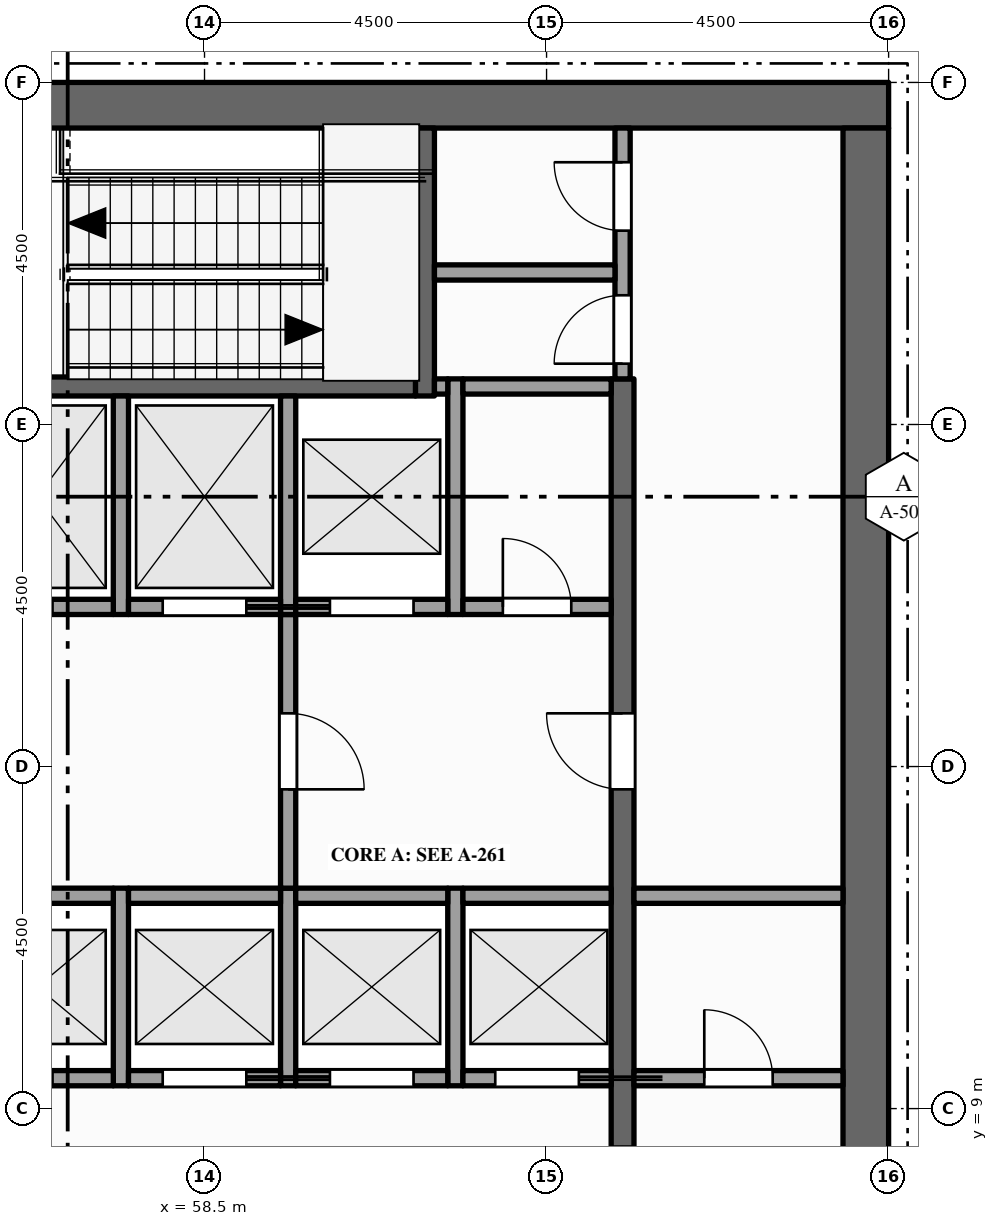
"""IFC4 building model, lengths in metres.
Left out: names, types, materials, properties, quantities, classifications, styles, units other than length and angle.
Written with IfcOpenShell. Run it as: python <this file> out.ifc"""

import sys

from ifc_helpers import new_model, si_unit, direction, frame, frame_2d, origin, place, context, subcontext, project, spatial, rectangle, extrude, element, fill, save


model = new_model("IFC4")
c1 = context("Model", 3, precision=1e-05, world=origin(), true_north=direction((0.0, 1.0)))
c2 = subcontext(c1, "Body", "Model", "MODEL_VIEW")
j1 = project(units=[si_unit("LENGTHUNIT", "METRE"), si_unit("PLANEANGLEUNIT", "RADIAN")], contexts=[c1])
p1 = place(None, origin())
s1 = spatial("IfcSite", under=j1, at=p1, CompositionType="ELEMENT")
p2 = place(p1, origin())
s2 = spatial("IfcBuilding", under=s1, at=p2, CompositionType="ELEMENT")
p3 = place(p2, frame((0.0, 0.0, 336.5)))
s3 = spatial("IfcBuildingStorey", under=s2, at=p3, CompositionType="ELEMENT", Elevation=336.5)
p4 = place(p3, frame((54.0, 22.2, -0.15), z_axis=(0.0, 0.0, 1.0), x_axis=(1.0, 0.0, 0.0)))
e1 = element("IfcWall", 1, at=p4, inside=s3, PredefinedType="SHEAR", context=c2, shape_type="SweptSolid", body=[
    extrude(rectangle(XDim=13.5, YDim=0.6, at=frame_2d((6.75, 0.0))), origin(), (0.0, 0.0, 1.0), 4.5),
])
p5 = place(p3, frame((67.2, 0.6, -0.15), z_axis=(0.0, 0.0, 1.0), x_axis=(0.0, 1.0, 0.0)))
e2 = element("IfcWall", 2, at=p5, inside=s3, PredefinedType="SHEAR", context=c2, shape_type="SweptSolid", body=[
    extrude(rectangle(XDim=21.3, YDim=0.6, at=frame_2d((10.65, 0.0))), origin(), (0.0, 0.0, 1.0), 4.5),
])
p6 = place(p3, frame((57.4, 9.3, 0.0), z_axis=(0.0, 0.0, 1.0), x_axis=(0.0, 1.0, 0.0)))
e3 = element("IfcWall", 3, at=p6, inside=s3, PredefinedType="SOLIDWALL", context=c2, shape_type="SweptSolid", body=[
    extrude(rectangle(XDim=2.6, YDim=0.2, at=frame_2d((1.3, 0.0))), origin(), (0.0, 0.0, 1.0), 4.35),
])
p7 = place(p3, frame((57.4, 15.5, 0.0), z_axis=(0.0, 0.0, 1.0), x_axis=(0.0, 1.0, 0.0)))
e4 = element("IfcWall", 4, at=p7, inside=s3, PredefinedType="SOLIDWALL", context=c2, shape_type="SweptSolid", body=[
    extrude(rectangle(XDim=2.875, YDim=0.2, at=frame_2d((1.438, 0.0))), origin(), (0.0, 0.0, 1.0), 4.35),
])
p8 = place(p3, frame((59.6, 9.3, 0.0), z_axis=(0.0, 0.0, 1.0), x_axis=(0.0, 1.0, 0.0)))
e5 = element("IfcWall", 5, at=p8, inside=s3, PredefinedType="SOLIDWALL", context=c2, shape_type="SweptSolid", body=[
    extrude(rectangle(XDim=2.6, YDim=0.2, at=frame_2d((1.3, 0.0))), origin(), (0.0, 0.0, 1.0), 4.35),
])
p9 = place(p3, frame((59.6, 11.9, 0.0), z_axis=(0.0, 0.0, 1.0), x_axis=(0.0, 1.0, 0.0)))
e6 = element("IfcWall", 6, at=p9, inside=s3, PredefinedType="PARTITIONING", context=c2, shape_type="SweptSolid", body=[
    extrude(rectangle(XDim=3.6, YDim=0.2, at=frame_2d((1.8, 0.0))), origin(), (0.0, 0.0, 1.0), 4.35),
])
p10 = place(p9, frame((1.3, 0.0, 0.0)))
e7 = element("IfcOpeningElement", 7, at=p10, cuts=e6, PredefinedType="OPENING", context=c2, shape_type="SweptSolid", body=[
    extrude(rectangle(XDim=1.0, YDim=2.1, at=frame_2d((0.5, 1.05))), frame((0.0, 0.11, 0.0), z_axis=(0.0, -1.0, 0.0), x_axis=(1.0, 0.0, 0.0)), (0.0, 0.0, 1.0), 0.22),
])
p11 = place(p3, frame((59.6, 15.5, 0.0), z_axis=(0.0, 0.0, 1.0), x_axis=(0.0, 1.0, 0.0)))
e8 = element("IfcWall", 8, at=p11, inside=s3, PredefinedType="SOLIDWALL", context=c2, shape_type="SweptSolid", body=[
    extrude(rectangle(XDim=2.875, YDim=0.2, at=frame_2d((1.438, 0.0))), origin(), (0.0, 0.0, 1.0), 4.35),
])
p12 = place(p3, frame((61.4, 18.375, 0.0), z_axis=(0.0, 0.0, 1.0), x_axis=(0.0, 1.0, 0.0)))
e9 = element("IfcWall", 9, at=p12, inside=s3, PredefinedType="SHEAR", context=c2, shape_type="SweptSolid", body=[
    extrude(rectangle(XDim=3.525, YDim=0.25, at=frame_2d((1.762, 0.0))), origin(), (0.0, 0.0, 1.0), 4.35),
])
p13 = place(p3, frame((61.8, 9.3, 0.0), z_axis=(0.0, 0.0, 1.0), x_axis=(0.0, 1.0, 0.0)))
e10 = element("IfcWall", 10, at=p13, inside=s3, PredefinedType="SOLIDWALL", context=c2, shape_type="SweptSolid", body=[
    extrude(rectangle(XDim=2.6, YDim=0.2, at=frame_2d((1.3, 0.0))), origin(), (0.0, 0.0, 1.0), 4.35),
])
p14 = place(p3, frame((61.8, 15.5, 0.0), z_axis=(0.0, 0.0, 1.0), x_axis=(0.0, 1.0, 0.0)))
e11 = element("IfcWall", 11, at=p14, inside=s3, PredefinedType="SOLIDWALL", context=c2, shape_type="SweptSolid", body=[
    extrude(rectangle(XDim=3.1, YDim=0.2, at=frame_2d((1.55, 0.0))), origin(), (0.0, 0.0, 1.0), 4.35),
])
p15 = place(p3, frame((64.0, 4.1, 0.0), z_axis=(0.0, 0.0, 1.0), x_axis=(0.0, 1.0, 0.0)))
e12 = element("IfcWall", 12, at=p15, inside=s3, PredefinedType="SHEAR", context=c2, shape_type="SweptSolid", body=[
    extrude(rectangle(XDim=14.5, YDim=0.3, at=frame_2d((7.25, 0.0))), origin(), (0.0, 0.0, 1.0), 4.35),
])
p16 = place(p15, frame((3.4, 0.0, 0.0)))
e13 = element("IfcOpeningElement", 13, at=p16, cuts=e12, PredefinedType="OPENING", context=c2, shape_type="SweptSolid", body=[
    extrude(rectangle(XDim=1.0, YDim=2.1, at=frame_2d((0.5, 1.05))), frame((0.0, 0.16, 0.0), z_axis=(0.0, -1.0, 0.0), x_axis=(1.0, 0.0, 0.0)), (0.0, 0.0, 1.0), 0.32),
])
p17 = place(p15, frame((9.1, 0.0, 0.0)))
e14 = element("IfcOpeningElement", 14, at=p17, cuts=e12, PredefinedType="OPENING", context=c2, shape_type="SweptSolid", body=[
    extrude(rectangle(XDim=1.0, YDim=2.1, at=frame_2d((0.5, 1.05))), frame((0.0, 0.16, 0.0), z_axis=(0.0, -1.0, 0.0), x_axis=(1.0, 0.0, 0.0)), (0.0, 0.0, 1.0), 0.32),
])
p18 = place(p3, frame((64.0, 18.6, 0.0), z_axis=(0.0, 0.0, 1.0), x_axis=(0.0, 1.0, 0.0)))
e15 = element("IfcWall", 15, at=p18, inside=s3, PredefinedType="PARTITIONING", context=c2, shape_type="SweptSolid", body=[
    extrude(rectangle(XDim=3.3, YDim=0.2, at=frame_2d((1.65, 0.0))), origin(), (0.0, 0.0, 1.0), 4.35),
])
p19 = place(p18, frame((0.2, 0.0, 0.0)))
e16 = element("IfcOpeningElement", 16, at=p19, cuts=e15, PredefinedType="OPENING", context=c2, shape_type="SweptSolid", body=[
    extrude(rectangle(XDim=0.9, YDim=2.1, at=frame_2d((0.45, 1.05))), frame((0.0, 0.11, 0.0), z_axis=(0.0, -1.0, 0.0), x_axis=(1.0, 0.0, 0.0)), (0.0, 0.0, 1.0), 0.22),
])
p20 = place(p18, frame((1.95, 0.0, 0.0)))
e17 = element("IfcOpeningElement", 17, at=p20, cuts=e15, PredefinedType="OPENING", context=c2, shape_type="SweptSolid", body=[
    extrude(rectangle(XDim=0.9, YDim=2.1, at=frame_2d((0.45, 1.05))), frame((0.0, 0.11, 0.0), z_axis=(0.0, -1.0, 0.0), x_axis=(1.0, 0.0, 0.0)), (0.0, 0.0, 1.0), 0.22),
])
p21 = place(p3, frame((54.6, 9.4, 0.0), z_axis=(0.0, 0.0, 1.0), x_axis=(1.0, 0.0, 0.0)))
e18 = element("IfcWall", 18, at=p21, inside=s3, PredefinedType="SOLIDWALL", context=c2, shape_type="SweptSolid", body=[
    extrude(rectangle(XDim=2.7, YDim=0.2, at=frame_2d((1.35, 0.0))), origin(), (0.0, 0.0, 1.0), 4.35),
])
p22 = place(p21, frame((0.8, 0.0, 0.012)))
e19 = element("IfcOpeningElement", 19, at=p22, cuts=e18, PredefinedType="OPENING", context=c2, shape_type="SweptSolid", body=[
    extrude(rectangle(XDim=1.1, YDim=2.1, at=frame_2d((0.55, 1.05))), frame((0.0, 0.11, 0.0), z_axis=(0.0, -1.0, 0.0), x_axis=(1.0, 0.0, 0.0)), (0.0, 0.0, 1.0), 0.22),
])
p23 = place(p3, frame((57.5, 9.4, 0.0), z_axis=(0.0, 0.0, 1.0), x_axis=(1.0, 0.0, 0.0)))
e20 = element("IfcWall", 20, at=p23, inside=s3, PredefinedType="SOLIDWALL", context=c2, shape_type="SweptSolid", body=[
    extrude(rectangle(XDim=2.0, YDim=0.2, at=frame_2d((1.0, 0.0))), origin(), (0.0, 0.0, 1.0), 4.35),
])
p24 = place(p23, frame((0.45, 0.0, 0.012)))
e21 = element("IfcOpeningElement", 21, at=p24, cuts=e20, PredefinedType="OPENING", context=c2, shape_type="SweptSolid", body=[
    extrude(rectangle(XDim=1.1, YDim=2.1, at=frame_2d((0.55, 1.05))), frame((0.0, 0.11, 0.0), z_axis=(0.0, -1.0, 0.0), x_axis=(1.0, 0.0, 0.0)), (0.0, 0.0, 1.0), 0.22),
])
p25 = place(p3, frame((59.7, 9.4, 0.0), z_axis=(0.0, 0.0, 1.0), x_axis=(1.0, 0.0, 0.0)))
e22 = element("IfcWall", 22, at=p25, inside=s3, PredefinedType="SOLIDWALL", context=c2, shape_type="SweptSolid", body=[
    extrude(rectangle(XDim=2.0, YDim=0.2, at=frame_2d((1.0, 0.0))), origin(), (0.0, 0.0, 1.0), 4.35),
])
p26 = place(p25, frame((0.45, 0.0, 0.012)))
e23 = element("IfcOpeningElement", 23, at=p26, cuts=e22, PredefinedType="OPENING", context=c2, shape_type="SweptSolid", body=[
    extrude(rectangle(XDim=1.1, YDim=2.1, at=frame_2d((0.55, 1.05))), frame((0.0, 0.11, 0.0), z_axis=(0.0, -1.0, 0.0), x_axis=(1.0, 0.0, 0.0)), (0.0, 0.0, 1.0), 0.22),
])
p27 = place(p3, frame((61.9, 9.4, 0.0), z_axis=(0.0, 0.0, 1.0), x_axis=(1.0, 0.0, 0.0)))
e24 = element("IfcWall", 24, at=p27, inside=s3, PredefinedType="SOLIDWALL", context=c2, shape_type="SweptSolid", body=[
    extrude(rectangle(XDim=1.95, YDim=0.2, at=frame_2d((0.975, 0.0))), origin(), (0.0, 0.0, 1.0), 4.35),
])
p28 = place(p27, frame((0.425, 0.0, 0.012)))
e25 = element("IfcOpeningElement", 25, at=p28, cuts=e24, PredefinedType="OPENING", context=c2, shape_type="SweptSolid", body=[
    extrude(rectangle(XDim=1.1, YDim=2.1, at=frame_2d((0.55, 1.05))), frame((0.0, 0.11, 0.0), z_axis=(0.0, -1.0, 0.0), x_axis=(1.0, 0.0, 0.0)), (0.0, 0.0, 1.0), 0.22),
])
p29 = place(p3, frame((64.15, 9.4, 0.0), z_axis=(0.0, 0.0, 1.0), x_axis=(1.0, 0.0, 0.0)))
e26 = element("IfcWall", 26, at=p29, inside=s3, PredefinedType="PARTITIONING", context=c2, shape_type="SweptSolid", body=[
    extrude(rectangle(XDim=2.75, YDim=0.2, at=frame_2d((1.375, 0.0))), origin(), (0.0, 0.0, 1.0), 4.35),
])
p30 = place(p29, frame((0.925, 0.0, 0.0)))
e27 = element("IfcOpeningElement", 27, at=p30, cuts=e26, PredefinedType="OPENING", context=c2, shape_type="SweptSolid", body=[
    extrude(rectangle(XDim=0.9, YDim=2.1, at=frame_2d((0.45, 1.05))), frame((0.0, 0.11, 0.0), z_axis=(0.0, -1.0, 0.0), x_axis=(1.0, 0.0, 0.0)), (0.0, 0.0, 1.0), 0.22),
])
p31 = place(p3, frame((54.6, 11.8, 0.0), z_axis=(0.0, 0.0, 1.0), x_axis=(1.0, 0.0, 0.0)))
e28 = element("IfcWall", 28, at=p31, inside=s3, PredefinedType="SOLIDWALL", context=c2, shape_type="SweptSolid", body=[
    extrude(rectangle(XDim=2.7, YDim=0.2, at=frame_2d((1.35, 0.0))), origin(), (0.0, 0.0, 1.0), 4.35),
])
for number, where, z_axis, x_axis in (
    (29, (57.5, 11.8, 0.0), (0.0, 0.0, 1.0), (1.0, 0.0, 0.0)),
    (30, (59.7, 11.8, 0.0), (0.0, 0.0, 1.0), (1.0, 0.0, 0.0)),
):
    element("IfcWall", number, at=place(p3, frame(where, z_axis=z_axis, x_axis=x_axis)), inside=s3, PredefinedType="SOLIDWALL", context=c2, shape_type="SweptSolid", body=[
        extrude(rectangle(XDim=2.0, YDim=0.2, at=frame_2d((1.0, 0.0))), origin(), (0.0, 0.0, 1.0), 4.35),
    ])
p32 = place(p3, frame((61.9, 11.8, 0.0), z_axis=(0.0, 0.0, 1.0), x_axis=(1.0, 0.0, 0.0)))
e31 = element("IfcWall", 31, at=p32, inside=s3, PredefinedType="SOLIDWALL", context=c2, shape_type="SweptSolid", body=[
    extrude(rectangle(XDim=1.95, YDim=0.2, at=frame_2d((0.975, 0.0))), origin(), (0.0, 0.0, 1.0), 4.35),
])
p33 = place(p3, frame((64.15, 11.8, 0.0), z_axis=(0.0, 0.0, 1.0), x_axis=(1.0, 0.0, 0.0)))
e32 = element("IfcWall", 32, at=p33, inside=s3, PredefinedType="PARTITIONING", context=c2, shape_type="SweptSolid", body=[
    extrude(rectangle(XDim=2.75, YDim=0.2, at=frame_2d((1.375, 0.0))), origin(), (0.0, 0.0, 1.0), 4.35),
])
p34 = place(p3, frame((54.6, 15.6, 0.0), z_axis=(0.0, 0.0, 1.0), x_axis=(1.0, 0.0, 0.0)))
e33 = element("IfcWall", 33, at=p34, inside=s3, PredefinedType="SOLIDWALL", context=c2, shape_type="SweptSolid", body=[
    extrude(rectangle(XDim=2.7, YDim=0.2, at=frame_2d((1.35, 0.0))), origin(), (0.0, 0.0, 1.0), 4.35),
])
p35 = place(p34, frame((0.8, 0.0, 0.012)))
e34 = element("IfcOpeningElement", 34, at=p35, cuts=e33, PredefinedType="OPENING", context=c2, shape_type="SweptSolid", body=[
    extrude(rectangle(XDim=1.1, YDim=2.1, at=frame_2d((0.55, 1.05))), frame((0.0, 0.11, 0.0), z_axis=(0.0, -1.0, 0.0), x_axis=(1.0, 0.0, 0.0)), (0.0, 0.0, 1.0), 0.22),
])
p36 = place(p3, frame((57.5, 15.6, 0.0), z_axis=(0.0, 0.0, 1.0), x_axis=(1.0, 0.0, 0.0)))
e35 = element("IfcWall", 35, at=p36, inside=s3, PredefinedType="SOLIDWALL", context=c2, shape_type="SweptSolid", body=[
    extrude(rectangle(XDim=2.0, YDim=0.2, at=frame_2d((1.0, 0.0))), origin(), (0.0, 0.0, 1.0), 4.35),
])
p37 = place(p36, frame((0.45, 0.0, 0.012)))
e36 = element("IfcOpeningElement", 36, at=p37, cuts=e35, PredefinedType="OPENING", context=c2, shape_type="SweptSolid", body=[
    extrude(rectangle(XDim=1.1, YDim=2.1, at=frame_2d((0.55, 1.05))), frame((0.0, 0.11, 0.0), z_axis=(0.0, -1.0, 0.0), x_axis=(1.0, 0.0, 0.0)), (0.0, 0.0, 1.0), 0.22),
])
p38 = place(p3, frame((59.7, 15.6, 0.0), z_axis=(0.0, 0.0, 1.0), x_axis=(1.0, 0.0, 0.0)))
e37 = element("IfcWall", 37, at=p38, inside=s3, PredefinedType="SOLIDWALL", context=c2, shape_type="SweptSolid", body=[
    extrude(rectangle(XDim=2.0, YDim=0.2, at=frame_2d((1.0, 0.0))), origin(), (0.0, 0.0, 1.0), 4.35),
])
p39 = place(p38, frame((0.45, 0.0, 0.012)))
e38 = element("IfcOpeningElement", 38, at=p39, cuts=e37, PredefinedType="OPENING", context=c2, shape_type="SweptSolid", body=[
    extrude(rectangle(XDim=1.1, YDim=2.1, at=frame_2d((0.55, 1.05))), frame((0.0, 0.11, 0.0), z_axis=(0.0, -1.0, 0.0), x_axis=(1.0, 0.0, 0.0)), (0.0, 0.0, 1.0), 0.22),
])
p40 = place(p3, frame((61.9, 15.6, 0.0), z_axis=(0.0, 0.0, 1.0), x_axis=(1.0, 0.0, 0.0)))
e39 = element("IfcWall", 39, at=p40, inside=s3, PredefinedType="PARTITIONING", context=c2, shape_type="SweptSolid", body=[
    extrude(rectangle(XDim=1.95, YDim=0.2, at=frame_2d((0.975, 0.0))), origin(), (0.0, 0.0, 1.0), 4.35),
])
p41 = place(p40, frame((0.525, 0.0, 0.0)))
e40 = element("IfcOpeningElement", 40, at=p41, cuts=e39, PredefinedType="OPENING", context=c2, shape_type="SweptSolid", body=[
    extrude(rectangle(XDim=0.9, YDim=2.1, at=frame_2d((0.45, 1.05))), frame((0.0, 0.11, 0.0), z_axis=(0.0, -1.0, 0.0), x_axis=(1.0, 0.0, 0.0)), (0.0, 0.0, 1.0), 0.22),
])
p42 = place(p3, frame((54.6, 18.5, 0.0), z_axis=(0.0, 0.0, 1.0), x_axis=(1.0, 0.0, 0.0)))
e41 = element("IfcWall", 41, at=p42, inside=s3, PredefinedType="SHEAR", context=c2, shape_type="SweptSolid", body=[
    extrude(rectangle(XDim=6.675, YDim=0.25, at=frame_2d((3.337, 0.0))), origin(), (0.0, 0.0, 1.0), 4.35),
])
p43 = place(p3, frame((61.525, 18.5, 0.0), z_axis=(0.0, 0.0, 1.0), x_axis=(1.0, 0.0, 0.0)))
e42 = element("IfcWall", 42, at=p43, inside=s3, PredefinedType="SOLIDWALL", context=c2, shape_type="SweptSolid", body=[
    extrude(rectangle(XDim=0.175, YDim=0.2, at=frame_2d((0.087, 0.0))), origin(), (0.0, 0.0, 1.0), 4.35),
])
p44 = place(p3, frame((61.9, 18.5, 0.0), z_axis=(0.0, 0.0, 1.0), x_axis=(1.0, 0.0, 0.0)))
e43 = element("IfcWall", 43, at=p44, inside=s3, PredefinedType="PARTITIONING", context=c2, shape_type="SweptSolid", body=[
    extrude(rectangle(XDim=1.95, YDim=0.2, at=frame_2d((0.975, 0.0))), origin(), (0.0, 0.0, 1.0), 4.35),
])
p45 = place(p3, frame((61.525, 20.0, 0.0), z_axis=(0.0, 0.0, 1.0), x_axis=(1.0, 0.0, 0.0)))
e44 = element("IfcWall", 44, at=p45, inside=s3, PredefinedType="PARTITIONING", context=c2, shape_type="SweptSolid", body=[
    extrude(rectangle(XDim=2.375, YDim=0.2, at=frame_2d((1.188, 0.0))), origin(), (0.0, 0.0, 1.0), 4.35),
])
p46 = place(p24, origin())
e45 = element("IfcDoor", 45, at=p46, inside=s3, OperationType="SLIDING_TO_RIGHT", PredefinedType="DOOR", context=c2, shape_type="SweptSolid", body=[
    extrude(rectangle(XDim=1.1, YDim=2.1, at=frame_2d((0.55, 1.05))), frame((0.0, 0.025, 0.0), z_axis=(0.0, -1.0, 0.0), x_axis=(1.0, 0.0, 0.0)), (0.0, 0.0, 1.0), 0.05),
])
fill(e21, e45)
p47 = place(p26, origin())
e46 = element("IfcDoor", 46, at=p47, inside=s3, OperationType="SLIDING_TO_LEFT", PredefinedType="DOOR", context=c2, shape_type="SweptSolid", body=[
    extrude(rectangle(XDim=1.1, YDim=2.1, at=frame_2d((0.55, 1.05))), frame((0.0, 0.025, 0.0), z_axis=(0.0, -1.0, 0.0), x_axis=(1.0, 0.0, 0.0)), (0.0, 0.0, 1.0), 0.05),
])
fill(e23, e46)
p48 = place(p28, origin())
e47 = element("IfcDoor", 47, at=p48, inside=s3, OperationType="SLIDING_TO_RIGHT", PredefinedType="DOOR", context=c2, shape_type="SweptSolid", body=[
    extrude(rectangle(XDim=1.1, YDim=2.1, at=frame_2d((0.55, 1.05))), frame((0.0, 0.025, 0.0), z_axis=(0.0, -1.0, 0.0), x_axis=(1.0, 0.0, 0.0)), (0.0, 0.0, 1.0), 0.05),
])
fill(e25, e47)
p49 = place(p37, origin())
e48 = element("IfcDoor", 48, at=p49, inside=s3, OperationType="SLIDING_TO_RIGHT", PredefinedType="DOOR", context=c2, shape_type="SweptSolid", body=[
    extrude(rectangle(XDim=1.1, YDim=2.1, at=frame_2d((0.55, 1.05))), frame((0.0, 0.025, 0.0), z_axis=(0.0, -1.0, 0.0), x_axis=(1.0, 0.0, 0.0)), (0.0, 0.0, 1.0), 0.05),
])
fill(e36, e48)
p50 = place(p39, origin())
e49 = element("IfcDoor", 49, at=p50, inside=s3, OperationType="SLIDING_TO_LEFT", PredefinedType="DOOR", context=c2, shape_type="SweptSolid", body=[
    extrude(rectangle(XDim=1.1, YDim=2.1, at=frame_2d((0.55, 1.05))), frame((0.0, 0.025, 0.0), z_axis=(0.0, -1.0, 0.0), x_axis=(1.0, 0.0, 0.0)), (0.0, 0.0, 1.0), 0.05),
])
fill(e38, e49)
p51 = place(p10, origin())
e50 = element("IfcDoor", 50, at=p51, inside=s3, OperationType="SINGLE_SWING_LEFT", PredefinedType="DOOR", context=c2, shape_type="SweptSolid", body=[
    extrude(rectangle(XDim=1.0, YDim=2.1, at=frame_2d((0.5, 1.05))), frame((0.0, 0.025, 0.0), z_axis=(0.0, -1.0, 0.0), x_axis=(1.0, 0.0, 0.0)), (0.0, 0.0, 1.0), 0.05),
])
fill(e7, e50)
p52 = place(p17, origin())
e51 = element("IfcDoor", 51, at=p52, inside=s3, OperationType="SINGLE_SWING_RIGHT", PredefinedType="DOOR", context=c2, shape_type="SweptSolid", body=[
    extrude(rectangle(XDim=1.0, YDim=2.1, at=frame_2d((0.5, 1.05))), frame((0.0, 0.025, 0.0), z_axis=(0.0, -1.0, 0.0), x_axis=(1.0, 0.0, 0.0)), (0.0, 0.0, 1.0), 0.05),
])
fill(e14, e51)
p53 = place(p30, origin())
e52 = element("IfcDoor", 52, at=p53, inside=s3, OperationType="SINGLE_SWING_LEFT", PredefinedType="DOOR", context=c2, shape_type="SweptSolid", body=[
    extrude(rectangle(XDim=0.9, YDim=2.1, at=frame_2d((0.45, 1.05))), frame((0.0, 0.025, 0.0), z_axis=(0.0, -1.0, 0.0), x_axis=(1.0, 0.0, 0.0)), (0.0, 0.0, 1.0), 0.05),
])
fill(e27, e52)
p54 = place(p19, origin())
e53 = element("IfcDoor", 53, at=p54, inside=s3, OperationType="SINGLE_SWING_LEFT", PredefinedType="DOOR", context=c2, shape_type="SweptSolid", body=[
    extrude(rectangle(XDim=0.9, YDim=2.1, at=frame_2d((0.45, 1.05))), frame((0.0, 0.025, 0.0), z_axis=(0.0, -1.0, 0.0), x_axis=(1.0, 0.0, 0.0)), (0.0, 0.0, 1.0), 0.05),
])
fill(e16, e53)
p55 = place(p20, origin())
e54 = element("IfcDoor", 54, at=p55, inside=s3, OperationType="SINGLE_SWING_RIGHT", PredefinedType="DOOR", context=c2, shape_type="SweptSolid", body=[
    extrude(rectangle(XDim=0.9, YDim=2.1, at=frame_2d((0.45, 1.05))), frame((0.0, 0.025, 0.0), z_axis=(0.0, -1.0, 0.0), x_axis=(1.0, 0.0, 0.0)), (0.0, 0.0, 1.0), 0.05),
])
fill(e17, e54)
p56 = place(p41, origin())
e55 = element("IfcDoor", 55, at=p56, inside=s3, OperationType="SINGLE_SWING_LEFT", PredefinedType="DOOR", context=c2, shape_type="SweptSolid", body=[
    extrude(rectangle(XDim=0.9, YDim=2.1, at=frame_2d((0.45, 1.05))), frame((0.0, 0.025, 0.0), z_axis=(0.0, -1.0, 0.0), x_axis=(1.0, 0.0, 0.0)), (0.0, 0.0, 1.0), 0.05),
])
fill(e40, e55)
save(model, sys.argv[1])
